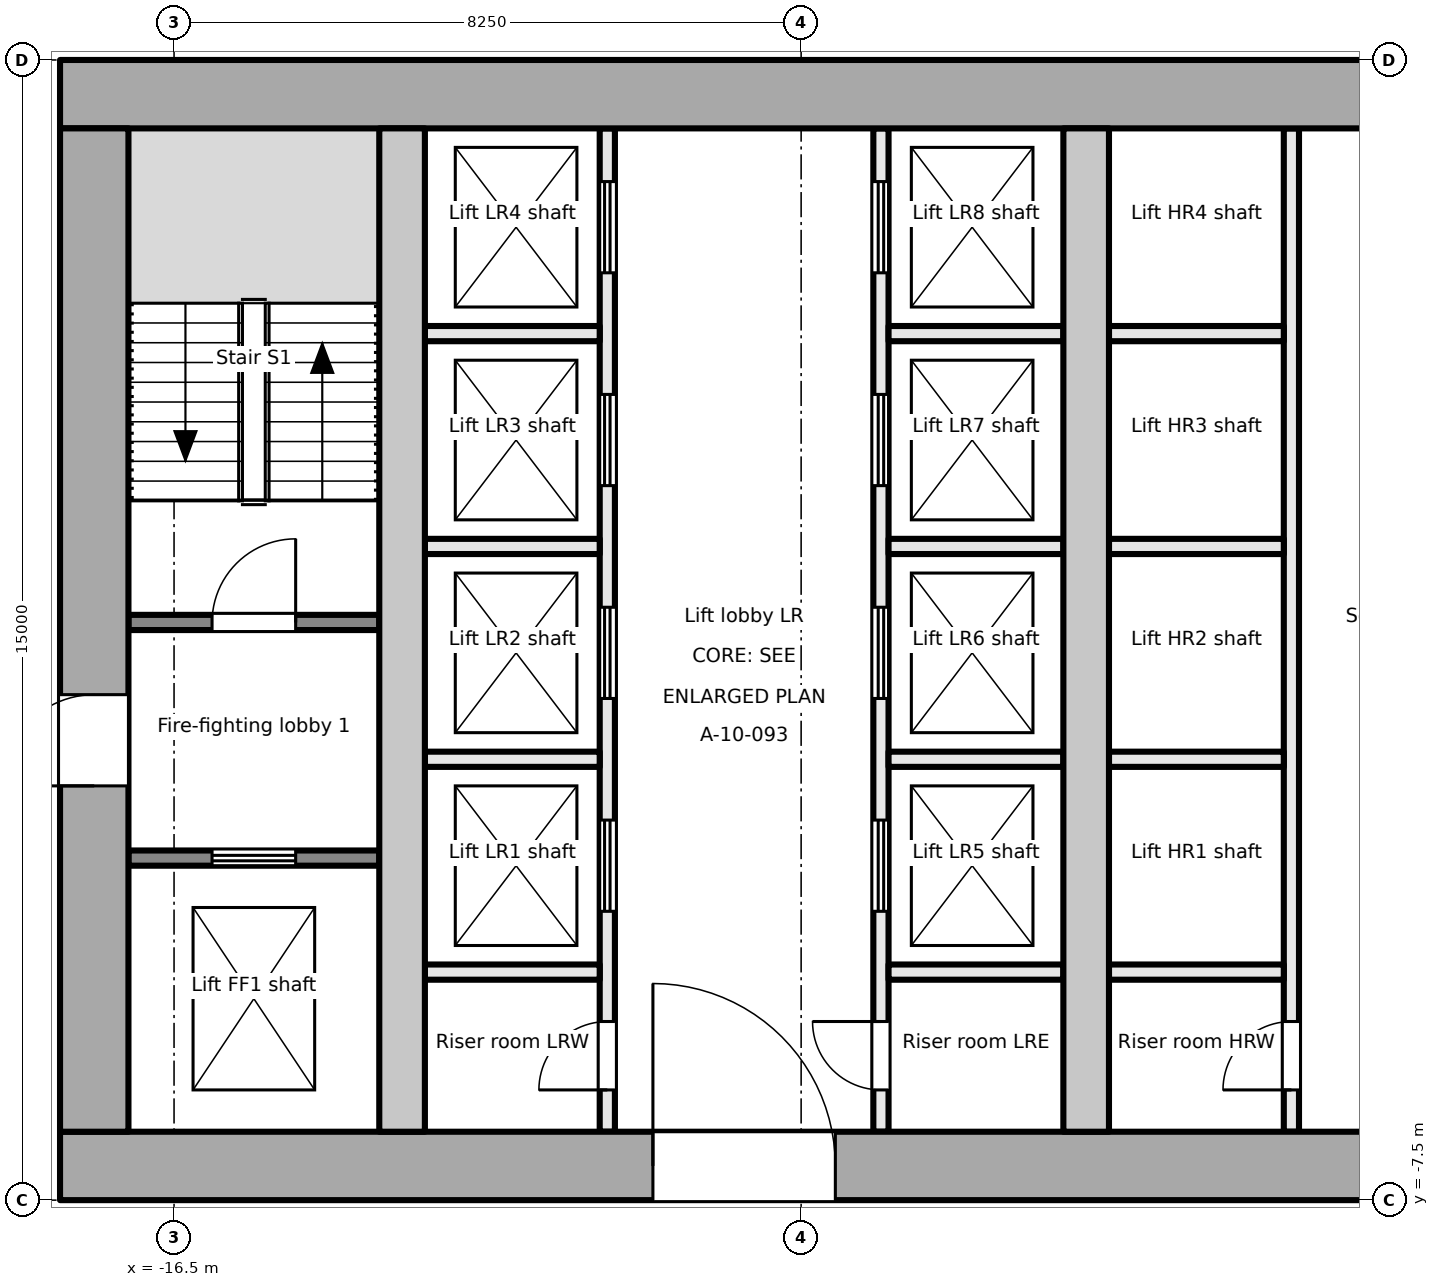
"""IFC4 building model, lengths in metres.
Left out: names, types, materials, properties, quantities, classifications, styles, units other than length and angle.
Written with IfcOpenShell. Run it as: python <this file> out.ifc"""

import sys

from ifc_helpers import new_model, si_unit, direction, frame, frame_2d, origin, place, context, subcontext, project, spatial, rectangle, extrude, element, fill, save


model = new_model("IFC4")
c1 = context("Model", 3, precision=1e-05, world=origin(), true_north=direction((0.0, 1.0)))
c2 = subcontext(c1, "Body", "Model", "MODEL_VIEW")
j1 = project(units=[si_unit("LENGTHUNIT", "METRE"), si_unit("PLANEANGLEUNIT", "RADIAN")], contexts=[c1])
p1 = place(None, origin())
s1 = spatial("IfcSite", under=j1, at=p1, CompositionType="ELEMENT")
p2 = place(p1, origin())
s2 = spatial("IfcBuilding", under=s1, at=p2, CompositionType="ELEMENT")
p3 = place(p2, frame((0.0, 0.0, 95.7)))
s3 = spatial("IfcBuildingStorey", under=s2, at=p3, CompositionType="ELEMENT", Elevation=95.7)
p4 = place(p3, frame((-18.0, -7.05, -0.2), z_axis=(0.0, 0.0, 1.0), x_axis=(1.0, 0.0, 0.0)))
e1 = element("IfcWall", 1, at=p4, inside=s3, PredefinedType="SHEAR", context=c2, shape_type="SweptSolid", body=[
    extrude(rectangle(XDim=36.0, YDim=0.9, at=frame_2d((18.0, 0.0))), origin(), (0.0, 0.0, 1.0), 4.0),
])
p5 = place(p4, frame((7.8, 0.0, 0.2)))
e2 = element("IfcOpeningElement", 2, at=p5, cuts=e1, PredefinedType="OPENING", context=c2, shape_type="SweptSolid", body=[
    extrude(rectangle(XDim=2.4, YDim=2.1, at=frame_2d((1.2, 1.05))), frame((0.0, 0.46, 0.0), z_axis=(0.0, -1.0, 0.0), x_axis=(1.0, 0.0, 0.0)), (0.0, 0.0, 1.0), 0.921),
])
p6 = place(p4, frame((17.4, 0.0, 0.2)))
e3 = element("IfcOpeningElement", 3, at=p6, cuts=e1, PredefinedType="OPENING", context=c2, shape_type="SweptSolid", body=[
    extrude(rectangle(XDim=1.2, YDim=2.1, at=frame_2d((0.6, 1.05))), frame((0.0, 0.46, 0.0), z_axis=(0.0, -1.0, 0.0), x_axis=(1.0, 0.0, 0.0)), (0.0, 0.0, 1.0), 0.921),
])
p7 = place(p4, frame((26.1, 0.0, 0.2)))
e4 = element("IfcOpeningElement", 4, at=p7, cuts=e1, PredefinedType="OPENING", context=c2, shape_type="SweptSolid", body=[
    extrude(rectangle(XDim=2.4, YDim=2.1, at=frame_2d((1.2, 1.05))), frame((0.0, 0.46, 0.0), z_axis=(0.0, -1.0, 0.0), x_axis=(1.0, 0.0, 0.0)), (0.0, 0.0, 1.0), 0.921),
])
p8 = place(p3, frame((-18.0, 7.05, -0.2), z_axis=(0.0, 0.0, 1.0), x_axis=(1.0, 0.0, 0.0)))
e5 = element("IfcWall", 5, at=p8, inside=s3, PredefinedType="SHEAR", context=c2, shape_type="SweptSolid", body=[
    extrude(rectangle(XDim=36.0, YDim=0.9, at=frame_2d((18.0, 0.0))), origin(), (0.0, 0.0, 1.0), 4.0),
])
p9 = place(p3, frame((-17.55, -6.6, -0.2), z_axis=(0.0, 0.0, 1.0), x_axis=(0.0, 1.0, 0.0)))
e6 = element("IfcWall", 6, at=p9, inside=s3, PredefinedType="SHEAR", context=c2, shape_type="SweptSolid", body=[
    extrude(rectangle(XDim=13.2, YDim=0.9, at=frame_2d((6.6, 0.0))), origin(), (0.0, 0.0, 1.0), 4.0),
])
p10 = place(p9, frame((4.55, 0.0, 0.2)))
e7 = element("IfcOpeningElement", 7, at=p10, cuts=e6, PredefinedType="OPENING", context=c2, shape_type="SweptSolid", body=[
    extrude(rectangle(XDim=1.2, YDim=2.1, at=frame_2d((0.6, 1.05))), frame((0.0, 0.46, 0.0), z_axis=(0.0, -1.0, 0.0), x_axis=(1.0, 0.0, 0.0)), (0.0, 0.0, 1.0), 0.921),
])
for number, where, z_axis, x_axis in (
    (8, (-13.5, -6.6, -0.2), (0.0, 0.0, 1.0), (0.0, 1.0, 0.0)),
    (9, (-4.5, -6.6, -0.2), (0.0, 0.0, 1.0), (0.0, 1.0, 0.0)),
):
    element("IfcWall", number, at=place(p3, frame(where, z_axis=z_axis, x_axis=x_axis)), inside=s3, PredefinedType="SHEAR", context=c2, shape_type="SweptSolid", body=[
        extrude(rectangle(XDim=13.2, YDim=0.6, at=frame_2d((6.6, 0.0))), origin(), (0.0, 0.0, 1.0), 4.0),
    ])
p11 = place(p3, frame((-17.1, -3.0, 0.0), z_axis=(0.0, 0.0, 1.0), x_axis=(1.0, 0.0, 0.0)))
e10 = element("IfcWall", 10, at=p11, inside=s3, PredefinedType="PARTITIONING", context=c2, shape_type="SweptSolid", body=[
    extrude(rectangle(XDim=3.3, YDim=0.2, at=frame_2d((1.65, 0.0))), origin(), (0.0, 0.0, 1.0), 3.8),
])
p12 = place(p11, frame((1.1, 0.0, 0.0)))
e11 = element("IfcOpeningElement", 11, at=p12, cuts=e10, PredefinedType="OPENING", context=c2, shape_type="SweptSolid", body=[
    extrude(rectangle(XDim=1.1, YDim=2.1, at=frame_2d((0.55, 1.05))), frame((0.0, 0.111, 0.0), z_axis=(0.0, -1.0, 0.0), x_axis=(1.0, 0.0, 0.0)), (0.0, 0.0, 1.0), 0.221),
])
p13 = place(p3, frame((-17.1, 0.1, 0.0), z_axis=(0.0, 0.0, 1.0), x_axis=(1.0, 0.0, 0.0)))
e12 = element("IfcWall", 12, at=p13, inside=s3, PredefinedType="PARTITIONING", context=c2, shape_type="SweptSolid", body=[
    extrude(rectangle(XDim=3.3, YDim=0.2, at=frame_2d((1.65, 0.0))), origin(), (0.0, 0.0, 1.0), 3.8),
])
p14 = place(p13, frame((1.1, 0.0, 0.0)))
e13 = element("IfcOpeningElement", 13, at=p14, cuts=e12, PredefinedType="OPENING", context=c2, shape_type="SweptSolid", body=[
    extrude(rectangle(XDim=1.1, YDim=2.1, at=frame_2d((0.55, 1.05))), frame((0.0, 0.111, 0.0), z_axis=(0.0, -1.0, 0.0), x_axis=(1.0, 0.0, 0.0)), (0.0, 0.0, 1.0), 0.221),
])
p15 = place(p3, frame((-10.8, -6.6, 0.0), z_axis=(0.0, 0.0, 1.0), x_axis=(0.0, 1.0, 0.0)))
e14 = element("IfcWall", 14, at=p15, inside=s3, PredefinedType="PARTITIONING", context=c2, shape_type="SweptSolid", body=[
    extrude(rectangle(XDim=13.2, YDim=0.2, at=frame_2d((6.6, 0.0))), origin(), (0.0, 0.0, 1.0), 3.8),
])
p16 = place(p15, frame((0.55, 0.0, 0.0)))
e15 = element("IfcOpeningElement", 15, at=p16, cuts=e14, PredefinedType="OPENING", context=c2, shape_type="SweptSolid", body=[
    extrude(rectangle(XDim=0.9, YDim=2.1, at=frame_2d((0.45, 1.05))), frame((0.0, 0.111, 0.0), z_axis=(0.0, -1.0, 0.0), x_axis=(1.0, 0.0, 0.0)), (0.0, 0.0, 1.0), 0.221),
])
p17 = place(p15, frame((2.9, 0.0, 0.0)))
e16 = element("IfcOpeningElement", 16, at=p17, cuts=e14, PredefinedType="OPENING", context=c2, shape_type="SweptSolid", body=[
    extrude(rectangle(XDim=1.2, YDim=2.1, at=frame_2d((0.6, 1.05))), frame((0.0, 0.111, 0.0), z_axis=(0.0, -1.0, 0.0), x_axis=(1.0, 0.0, 0.0)), (0.0, 0.0, 1.0), 0.221),
])
p18 = place(p15, frame((5.7, 0.0, 0.0)))
e17 = element("IfcOpeningElement", 17, at=p18, cuts=e14, PredefinedType="OPENING", context=c2, shape_type="SweptSolid", body=[
    extrude(rectangle(XDim=1.2, YDim=2.1, at=frame_2d((0.6, 1.05))), frame((0.0, 0.111, 0.0), z_axis=(0.0, -1.0, 0.0), x_axis=(1.0, 0.0, 0.0)), (0.0, 0.0, 1.0), 0.221),
])
p19 = place(p15, frame((8.5, 0.0, 0.0)))
e18 = element("IfcOpeningElement", 18, at=p19, cuts=e14, PredefinedType="OPENING", context=c2, shape_type="SweptSolid", body=[
    extrude(rectangle(XDim=1.2, YDim=2.1, at=frame_2d((0.6, 1.05))), frame((0.0, 0.111, 0.0), z_axis=(0.0, -1.0, 0.0), x_axis=(1.0, 0.0, 0.0)), (0.0, 0.0, 1.0), 0.221),
])
p20 = place(p15, frame((11.3, 0.0, 0.0)))
e19 = element("IfcOpeningElement", 19, at=p20, cuts=e14, PredefinedType="OPENING", context=c2, shape_type="SweptSolid", body=[
    extrude(rectangle(XDim=1.2, YDim=2.1, at=frame_2d((0.6, 1.05))), frame((0.0, 0.111, 0.0), z_axis=(0.0, -1.0, 0.0), x_axis=(1.0, 0.0, 0.0)), (0.0, 0.0, 1.0), 0.221),
])
p21 = place(p3, frame((-7.2, -6.6, 0.0), z_axis=(0.0, 0.0, 1.0), x_axis=(0.0, 1.0, 0.0)))
e20 = element("IfcWall", 20, at=p21, inside=s3, PredefinedType="PARTITIONING", context=c2, shape_type="SweptSolid", body=[
    extrude(rectangle(XDim=13.2, YDim=0.2, at=frame_2d((6.6, 0.0))), origin(), (0.0, 0.0, 1.0), 3.8),
])
p22 = place(p21, frame((0.55, 0.0, 0.0)))
e21 = element("IfcOpeningElement", 21, at=p22, cuts=e20, PredefinedType="OPENING", context=c2, shape_type="SweptSolid", body=[
    extrude(rectangle(XDim=0.9, YDim=2.1, at=frame_2d((0.45, 1.05))), frame((0.0, 0.111, 0.0), z_axis=(0.0, -1.0, 0.0), x_axis=(1.0, 0.0, 0.0)), (0.0, 0.0, 1.0), 0.221),
])
p23 = place(p21, frame((2.9, 0.0, 0.0)))
e22 = element("IfcOpeningElement", 22, at=p23, cuts=e20, PredefinedType="OPENING", context=c2, shape_type="SweptSolid", body=[
    extrude(rectangle(XDim=1.2, YDim=2.1, at=frame_2d((0.6, 1.05))), frame((0.0, 0.111, 0.0), z_axis=(0.0, -1.0, 0.0), x_axis=(1.0, 0.0, 0.0)), (0.0, 0.0, 1.0), 0.221),
])
p24 = place(p21, frame((5.7, 0.0, 0.0)))
e23 = element("IfcOpeningElement", 23, at=p24, cuts=e20, PredefinedType="OPENING", context=c2, shape_type="SweptSolid", body=[
    extrude(rectangle(XDim=1.2, YDim=2.1, at=frame_2d((0.6, 1.05))), frame((0.0, 0.111, 0.0), z_axis=(0.0, -1.0, 0.0), x_axis=(1.0, 0.0, 0.0)), (0.0, 0.0, 1.0), 0.221),
])
p25 = place(p21, frame((8.5, 0.0, 0.0)))
e24 = element("IfcOpeningElement", 24, at=p25, cuts=e20, PredefinedType="OPENING", context=c2, shape_type="SweptSolid", body=[
    extrude(rectangle(XDim=1.2, YDim=2.1, at=frame_2d((0.6, 1.05))), frame((0.0, 0.111, 0.0), z_axis=(0.0, -1.0, 0.0), x_axis=(1.0, 0.0, 0.0)), (0.0, 0.0, 1.0), 0.221),
])
p26 = place(p21, frame((11.3, 0.0, 0.0)))
e25 = element("IfcOpeningElement", 25, at=p26, cuts=e20, PredefinedType="OPENING", context=c2, shape_type="SweptSolid", body=[
    extrude(rectangle(XDim=1.2, YDim=2.1, at=frame_2d((0.6, 1.05))), frame((0.0, 0.111, 0.0), z_axis=(0.0, -1.0, 0.0), x_axis=(1.0, 0.0, 0.0)), (0.0, 0.0, 1.0), 0.221),
])
for number, where, z_axis, x_axis in (
    (26, (-13.2, -1.7, 0.0), (0.0, 0.0, 1.0), (1.0, 0.0, 0.0)),
    (27, (-13.2, 1.1, 0.0), (0.0, 0.0, 1.0), (1.0, 0.0, 0.0)),
    (28, (-13.2, 3.9, 0.0), (0.0, 0.0, 1.0), (1.0, 0.0, 0.0)),
    (29, (-13.2, -4.5, 0.0), (0.0, 0.0, 1.0), (1.0, 0.0, 0.0)),
    (30, (-7.1, -1.7, 0.0), (0.0, 0.0, 1.0), (1.0, 0.0, 0.0)),
    (31, (-7.1, 1.1, 0.0), (0.0, 0.0, 1.0), (1.0, 0.0, 0.0)),
    (32, (-7.1, 3.9, 0.0), (0.0, 0.0, 1.0), (1.0, 0.0, 0.0)),
    (33, (-7.1, -4.5, 0.0), (0.0, 0.0, 1.0), (1.0, 0.0, 0.0)),
):
    element("IfcWall", number, at=place(p3, frame(where, z_axis=z_axis, x_axis=x_axis)), inside=s3, PredefinedType="PARTITIONING", context=c2, shape_type="SweptSolid", body=[
        extrude(rectangle(XDim=2.3, YDim=0.2, at=frame_2d((1.15, 0.0))), origin(), (0.0, 0.0, 1.0), 3.8),
    ])
p27 = place(p3, frame((-1.8, -6.6, 0.0), z_axis=(0.0, 0.0, 1.0), x_axis=(0.0, 1.0, 0.0)))
e34 = element("IfcWall", 34, at=p27, inside=s3, PredefinedType="PARTITIONING", context=c2, shape_type="SweptSolid", body=[
    extrude(rectangle(XDim=13.2, YDim=0.2, at=frame_2d((6.6, 0.0))), origin(), (0.0, 0.0, 1.0), 3.8),
])
p28 = place(p27, frame((0.55, 0.0, 0.0)))
e35 = element("IfcOpeningElement", 35, at=p28, cuts=e34, PredefinedType="OPENING", context=c2, shape_type="SweptSolid", body=[
    extrude(rectangle(XDim=0.9, YDim=2.1, at=frame_2d((0.45, 1.05))), frame((0.0, 0.111, 0.0), z_axis=(0.0, -1.0, 0.0), x_axis=(1.0, 0.0, 0.0)), (0.0, 0.0, 1.0), 0.221),
])
for number, where, z_axis, x_axis in (
    (36, (-4.2, -1.7, 0.0), (0.0, 0.0, 1.0), (1.0, 0.0, 0.0)),
    (37, (-4.2, 1.1, 0.0), (0.0, 0.0, 1.0), (1.0, 0.0, 0.0)),
    (38, (-4.2, 3.9, 0.0), (0.0, 0.0, 1.0), (1.0, 0.0, 0.0)),
    (39, (-4.2, -4.5, 0.0), (0.0, 0.0, 1.0), (1.0, 0.0, 0.0)),
):
    element("IfcWall", number, at=place(p3, frame(where, z_axis=z_axis, x_axis=x_axis)), inside=s3, PredefinedType="PARTITIONING", context=c2, shape_type="SweptSolid", body=[
        extrude(rectangle(XDim=2.3, YDim=0.2, at=frame_2d((1.15, 0.0))), origin(), (0.0, 0.0, 1.0), 3.8),
    ])
p29 = place(p12, origin())
e40 = element("IfcDoor", 40, at=p29, inside=s3, OperationType="DOUBLE_DOOR_SLIDING", PredefinedType="DOOR", context=c2, shape_type="SweptSolid", body=[
    extrude(rectangle(XDim=1.1, YDim=2.1, at=frame_2d((0.55, 1.05))), frame((0.0, 0.025, 0.0), z_axis=(0.0, -1.0, 0.0), x_axis=(1.0, 0.0, 0.0)), (0.0, 0.0, 1.0), 0.05),
])
fill(e11, e40)
p30 = place(p10, origin())
e41 = element("IfcDoor", 41, at=p30, inside=s3, OperationType="SINGLE_SWING_LEFT", PredefinedType="DOOR", context=c2, shape_type="SweptSolid", body=[
    extrude(rectangle(XDim=1.2, YDim=2.1, at=frame_2d((0.6, 1.05))), frame((0.0, 0.025, 0.0), z_axis=(0.0, -1.0, 0.0), x_axis=(1.0, 0.0, 0.0)), (0.0, 0.0, 1.0), 0.05),
])
fill(e7, e41)
p31 = place(p14, origin())
e42 = element("IfcDoor", 42, at=p31, inside=s3, OperationType="SINGLE_SWING_RIGHT", PredefinedType="DOOR", context=c2, shape_type="SweptSolid", body=[
    extrude(rectangle(XDim=1.1, YDim=2.1, at=frame_2d((0.55, 1.05))), frame((0.0, 0.025, 0.0), z_axis=(0.0, -1.0, 0.0), x_axis=(1.0, 0.0, 0.0)), (0.0, 0.0, 1.0), 0.05),
])
fill(e13, e42)
p32 = place(p16, origin())
e43 = element("IfcDoor", 43, at=p32, inside=s3, OperationType="SINGLE_SWING_LEFT", PredefinedType="DOOR", context=c2, shape_type="SweptSolid", body=[
    extrude(rectangle(XDim=0.9, YDim=2.1, at=frame_2d((0.45, 1.05))), frame((0.0, 0.025, 0.0), z_axis=(0.0, -1.0, 0.0), x_axis=(1.0, 0.0, 0.0)), (0.0, 0.0, 1.0), 0.05),
])
fill(e15, e43)
p33 = place(p17, origin())
e44 = element("IfcDoor", 44, at=p33, inside=s3, OperationType="DOUBLE_DOOR_SLIDING", PredefinedType="DOOR", context=c2, shape_type="SweptSolid", body=[
    extrude(rectangle(XDim=1.2, YDim=2.1, at=frame_2d((0.6, 1.05))), frame((0.0, 0.025, 0.0), z_axis=(0.0, -1.0, 0.0), x_axis=(1.0, 0.0, 0.0)), (0.0, 0.0, 1.0), 0.05),
])
fill(e16, e44)
p34 = place(p18, origin())
e45 = element("IfcDoor", 45, at=p34, inside=s3, OperationType="DOUBLE_DOOR_SLIDING", PredefinedType="DOOR", context=c2, shape_type="SweptSolid", body=[
    extrude(rectangle(XDim=1.2, YDim=2.1, at=frame_2d((0.6, 1.05))), frame((0.0, 0.025, 0.0), z_axis=(0.0, -1.0, 0.0), x_axis=(1.0, 0.0, 0.0)), (0.0, 0.0, 1.0), 0.05),
])
fill(e17, e45)
p35 = place(p19, origin())
e46 = element("IfcDoor", 46, at=p35, inside=s3, OperationType="DOUBLE_DOOR_SLIDING", PredefinedType="DOOR", context=c2, shape_type="SweptSolid", body=[
    extrude(rectangle(XDim=1.2, YDim=2.1, at=frame_2d((0.6, 1.05))), frame((0.0, 0.025, 0.0), z_axis=(0.0, -1.0, 0.0), x_axis=(1.0, 0.0, 0.0)), (0.0, 0.0, 1.0), 0.05),
])
fill(e18, e46)
p36 = place(p20, origin())
e47 = element("IfcDoor", 47, at=p36, inside=s3, OperationType="DOUBLE_DOOR_SLIDING", PredefinedType="DOOR", context=c2, shape_type="SweptSolid", body=[
    extrude(rectangle(XDim=1.2, YDim=2.1, at=frame_2d((0.6, 1.05))), frame((0.0, 0.025, 0.0), z_axis=(0.0, -1.0, 0.0), x_axis=(1.0, 0.0, 0.0)), (0.0, 0.0, 1.0), 0.05),
])
fill(e19, e47)
p37 = place(p22, origin())
e48 = element("IfcDoor", 48, at=p37, inside=s3, OperationType="SINGLE_SWING_RIGHT", PredefinedType="DOOR", context=c2, shape_type="SweptSolid", body=[
    extrude(rectangle(XDim=0.9, YDim=2.1, at=frame_2d((0.45, 1.05))), frame((0.0, 0.025, 0.0), z_axis=(0.0, -1.0, 0.0), x_axis=(1.0, 0.0, 0.0)), (0.0, 0.0, 1.0), 0.05),
])
fill(e21, e48)
p38 = place(p23, origin())
e49 = element("IfcDoor", 49, at=p38, inside=s3, OperationType="DOUBLE_DOOR_SLIDING", PredefinedType="DOOR", context=c2, shape_type="SweptSolid", body=[
    extrude(rectangle(XDim=1.2, YDim=2.1, at=frame_2d((0.6, 1.05))), frame((0.0, 0.025, 0.0), z_axis=(0.0, -1.0, 0.0), x_axis=(1.0, 0.0, 0.0)), (0.0, 0.0, 1.0), 0.05),
])
fill(e22, e49)
p39 = place(p24, origin())
e50 = element("IfcDoor", 50, at=p39, inside=s3, OperationType="DOUBLE_DOOR_SLIDING", PredefinedType="DOOR", context=c2, shape_type="SweptSolid", body=[
    extrude(rectangle(XDim=1.2, YDim=2.1, at=frame_2d((0.6, 1.05))), frame((0.0, 0.025, 0.0), z_axis=(0.0, -1.0, 0.0), x_axis=(1.0, 0.0, 0.0)), (0.0, 0.0, 1.0), 0.05),
])
fill(e23, e50)
p40 = place(p25, origin())
e51 = element("IfcDoor", 51, at=p40, inside=s3, OperationType="DOUBLE_DOOR_SLIDING", PredefinedType="DOOR", context=c2, shape_type="SweptSolid", body=[
    extrude(rectangle(XDim=1.2, YDim=2.1, at=frame_2d((0.6, 1.05))), frame((0.0, 0.025, 0.0), z_axis=(0.0, -1.0, 0.0), x_axis=(1.0, 0.0, 0.0)), (0.0, 0.0, 1.0), 0.05),
])
fill(e24, e51)
p41 = place(p26, origin())
e52 = element("IfcDoor", 52, at=p41, inside=s3, OperationType="DOUBLE_DOOR_SLIDING", PredefinedType="DOOR", context=c2, shape_type="SweptSolid", body=[
    extrude(rectangle(XDim=1.2, YDim=2.1, at=frame_2d((0.6, 1.05))), frame((0.0, 0.025, 0.0), z_axis=(0.0, -1.0, 0.0), x_axis=(1.0, 0.0, 0.0)), (0.0, 0.0, 1.0), 0.05),
])
fill(e25, e52)
p42 = place(p5, origin())
e53 = element("IfcDoor", 53, at=p42, inside=s3, OperationType="DOUBLE_DOOR_DOUBLE_SWING", PredefinedType="DOOR", context=c2, shape_type="SweptSolid", body=[
    extrude(rectangle(XDim=2.4, YDim=2.1, at=frame_2d((1.2, 1.05))), frame((0.0, 0.025, 0.0), z_axis=(0.0, -1.0, 0.0), x_axis=(1.0, 0.0, 0.0)), (0.0, 0.0, 1.0), 0.05),
])
fill(e2, e53)
p43 = place(p28, origin())
e54 = element("IfcDoor", 54, at=p43, inside=s3, OperationType="SINGLE_SWING_LEFT", PredefinedType="DOOR", context=c2, shape_type="SweptSolid", body=[
    extrude(rectangle(XDim=0.9, YDim=2.1, at=frame_2d((0.45, 1.05))), frame((0.0, 0.025, 0.0), z_axis=(0.0, -1.0, 0.0), x_axis=(1.0, 0.0, 0.0)), (0.0, 0.0, 1.0), 0.05),
])
fill(e35, e54)
save(model, sys.argv[1])
